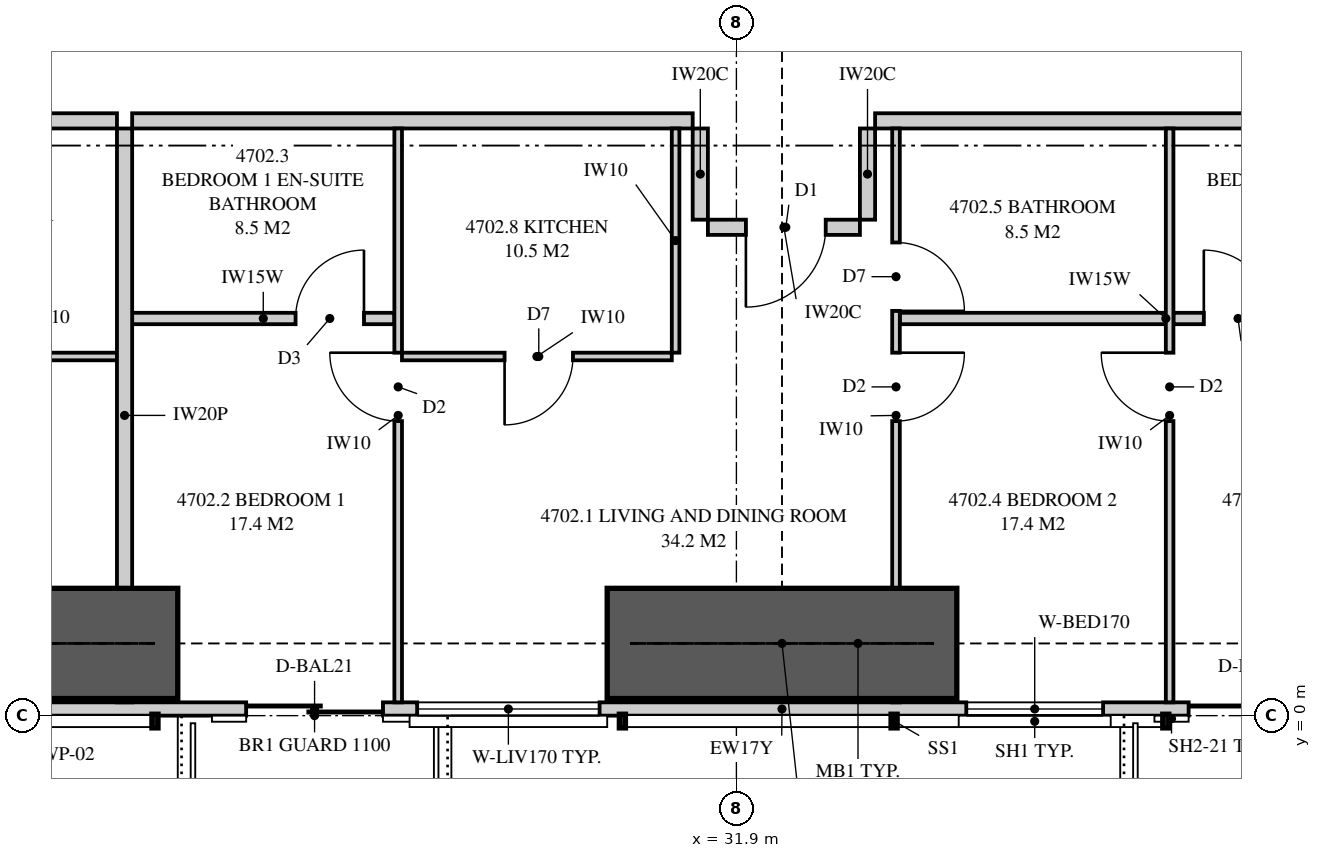
"""IFC4 building model, lengths in metres.
Left out: names, types, materials, properties, quantities, classifications, styles, units other than length and angle.
Written with IfcOpenShell. Run it as: python <this file> out.ifc"""

import sys

from ifc_helpers import new_model, si_unit, direction, frame, frame_2d, origin, place, context, subcontext, project, spatial, polyline, rectangle, outline, extrude, element, fill, save


model = new_model("IFC4")
c1 = context("Model", 3, precision=1e-05, world=origin(), true_north=direction((0.0, 1.0)))
c2 = subcontext(c1, "Body", "Model", "MODEL_VIEW")
j1 = project(units=[si_unit("LENGTHUNIT", "METRE"), si_unit("PLANEANGLEUNIT", "RADIAN")], contexts=[c1])
p1 = place(None, origin())
s1 = spatial("IfcSite", under=j1, at=p1, CompositionType="ELEMENT")
p2 = place(p1, origin())
s2 = spatial("IfcBuilding", under=s1, at=p2, CompositionType="ELEMENT")
p3 = place(p2, frame((0.0, 0.0, 174.45)))
s3 = spatial("IfcBuildingStorey", under=s2, at=p3, CompositionType="ELEMENT", Elevation=174.45)
p4 = place(p3, frame((15.051, 0.087, 0.0), z_axis=(0.0, 0.0, 1.0), x_axis=(1.0, 0.0, 0.0)))
e1 = element("IfcWall", 1, at=p4, inside=s3, PredefinedType="SOLIDWALL", context=c2, shape_type="SweptSolid", body=[
    extrude(outline(polyline([(0.0, 0.0), (34.897, 0.0), (34.897, 3.11), (27.91, 3.11), (27.91, 2.15), (27.836, 2.15), (27.836, 3.11), (27.699, 3.11), (27.699, 2.15), (7.199, 2.15), (7.199, 3.11), (7.062, 3.11), (7.062, 2.15), (6.987, 2.15), (6.987, 3.11), (0.0, 3.11), (0.0, 0.0)])), frame((0.0, 0.087, 0.0), z_axis=(0.0, -1.0, 0.0), x_axis=(1.0, 0.0, 0.0)), (0.0, 0.0, 1.0), 0.175),
])
p5 = place(p4, frame((2.31, 0.0, 0.4)))
e2 = element("IfcOpeningElement", 2, at=p5, cuts=e1, PredefinedType="OPENING", context=c2, shape_type="SweptSolid", body=[
    extrude(rectangle(XDim=2.4, YDim=1.7, at=frame_2d((1.2, 0.85))), frame((0.0, 0.097, 0.0), z_axis=(0.0, -1.0, 0.0), x_axis=(1.0, 0.0, 0.0)), (0.0, 0.0, 1.0), 0.195),
])
p6 = place(p4, frame((10.399, 0.0, 0.0)))
e3 = element("IfcOpeningElement", 3, at=p6, cuts=e1, PredefinedType="OPENING", context=c2, shape_type="SweptSolid", body=[
    extrude(rectangle(XDim=1.8, YDim=2.1, at=frame_2d((0.9, 1.05))), frame((0.0, 0.097, 0.0), z_axis=(0.0, -1.0, 0.0), x_axis=(1.0, 0.0, 0.0)), (0.0, 0.0, 1.0), 0.195),
])
p7 = place(p4, frame((12.649, 0.0, 0.4)))
e4 = element("IfcOpeningElement", 4, at=p7, cuts=e1, PredefinedType="OPENING", context=c2, shape_type="SweptSolid", body=[
    extrude(rectangle(XDim=2.4, YDim=1.7, at=frame_2d((1.2, 0.85))), frame((0.0, 0.097, 0.0), z_axis=(0.0, -1.0, 0.0), x_axis=(1.0, 0.0, 0.0)), (0.0, 0.0, 1.0), 0.195),
])
p8 = place(p4, frame((19.874, 0.0, 0.4)))
e5 = element("IfcOpeningElement", 5, at=p8, cuts=e1, PredefinedType="OPENING", context=c2, shape_type="SweptSolid", body=[
    extrude(rectangle(XDim=1.8, YDim=1.7, at=frame_2d((0.9, 0.85))), frame((0.0, 0.097, 0.0), z_axis=(0.0, -1.0, 0.0), x_axis=(1.0, 0.0, 0.0)), (0.0, 0.0, 1.0), 0.195),
])
p9 = place(p4, frame((22.799, 0.0, 0.0)))
e6 = element("IfcOpeningElement", 6, at=p9, cuts=e1, PredefinedType="OPENING", context=c2, shape_type="SweptSolid", body=[
    extrude(rectangle(XDim=1.8, YDim=2.1, at=frame_2d((0.9, 1.05))), frame((0.0, 0.097, 0.0), z_axis=(0.0, -1.0, 0.0), x_axis=(1.0, 0.0, 0.0)), (0.0, 0.0, 1.0), 0.195),
])
p10 = place(p4, frame((30.205, 0.0, 0.4)))
e7 = element("IfcOpeningElement", 7, at=p10, cuts=e1, PredefinedType="OPENING", context=c2, shape_type="SweptSolid", body=[
    extrude(rectangle(XDim=2.4, YDim=1.7, at=frame_2d((1.2, 0.85))), frame((0.0, 0.097, 0.0), z_axis=(0.0, -1.0, 0.0), x_axis=(1.0, 0.0, 0.0)), (0.0, 0.0, 1.0), 0.195),
])
p11 = place(p3, frame((23.85, 0.175, 0.0), z_axis=(0.0, 0.0, 1.0), x_axis=(0.0, 1.0, 0.0)))
e8 = element("IfcWall", 8, at=p11, inside=s3, PredefinedType="PARTITIONING", context=c2, shape_type="SweptSolid", body=[
    extrude(outline(polyline([(0.529, 2.15), (0.0, 2.15), (0.0, 0.0), (0.529, 0.0), (0.529, 0.207), (1.021, 0.207), (1.021, 0.0), (7.55, 0.0), (7.55, 3.11), (1.685, 3.11), (1.685, 2.15), (1.021, 2.15), (1.021, 1.944), (0.529, 1.944), (0.529, 2.15)])), frame((0.0, 0.1, 0.0), z_axis=(0.0, -1.0, 0.0), x_axis=(1.0, 0.0, 0.0)), (0.0, 0.0, 1.0), 0.2),
])
p12 = place(p3, frame((17.85, 7.825, 0.0), z_axis=(0.0, 0.0, 1.0), x_axis=(1.0, 0.0, 0.0)))
e9 = element("IfcWall", 9, at=p12, inside=s3, PredefinedType="PARTITIONING", context=c2, shape_type="SweptSolid", body=[
    extrude(outline(polyline([(0.0, 0.0), (5.9, 0.0), (5.9, 3.11), (4.737, 3.11), (4.737, 2.541), (4.062, 2.541), (4.062, 3.11), (0.0, 3.11), (0.0, 0.0)])), frame((0.0, 0.1, 0.0), z_axis=(0.0, -1.0, 0.0), x_axis=(1.0, 0.0, 0.0)), (0.0, 0.0, 1.0), 0.2),
])
p13 = place(p12, frame((2.5, 0.0, 0.0)))
e10 = element("IfcOpeningElement", 10, at=p13, cuts=e9, PredefinedType="OPENING", context=c2, shape_type="SweptSolid", body=[
    extrude(rectangle(XDim=1.05, YDim=2.2, at=frame_2d((0.525, 1.1))), frame((0.0, 0.11, 0.0), z_axis=(0.0, -1.0, 0.0), x_axis=(1.0, 0.0, 0.0)), (0.0, 0.0, 1.0), 0.22),
])
p14 = place(p3, frame((20.2, 4.725, 0.0), z_axis=(0.0, 0.0, 1.0), x_axis=(1.0, 0.0, 0.0)))
e11 = element("IfcWall", 11, at=p14, inside=s3, PredefinedType="PARTITIONING", context=c2, shape_type="SweptSolid", body=[
    extrude(outline(polyline([(0.0, 0.0), (3.55, 0.0), (3.55, 3.11), (2.337, 3.11), (2.337, 2.541), (1.763, 2.541), (1.763, 3.11), (0.0, 3.11), (0.0, 0.0)])), frame((0.0, 0.05, 0.0), z_axis=(0.0, -1.0, 0.0), x_axis=(1.0, 0.0, 0.0)), (0.0, 0.0, 1.0), 0.1),
])
p15 = place(p14, frame((1.3, 0.0, 0.0)))
e12 = element("IfcOpeningElement", 12, at=p15, cuts=e11, PredefinedType="OPENING", context=c2, shape_type="SweptSolid", body=[
    extrude(rectangle(XDim=0.9, YDim=2.1, at=frame_2d((0.45, 1.05))), frame((0.0, 0.06, 0.0), z_axis=(0.0, -1.0, 0.0), x_axis=(1.0, 0.0, 0.0)), (0.0, 0.0, 1.0), 0.12),
])
p16 = place(p3, frame((23.95, 7.825, 0.0), z_axis=(0.0, 0.0, 1.0), x_axis=(1.0, 0.0, 0.0)))
e13 = element("IfcWall", 13, at=p16, inside=s3, PredefinedType="PARTITIONING", context=c2, shape_type="SweptSolid", body=[
    extrude(rectangle(XDim=7.375, YDim=0.2, at=frame_2d((3.688, 0.0))), origin(), (0.0, 0.0, 1.0), 3.11),
])
p17 = place(p3, frame((27.45, 0.175, 0.0), z_axis=(0.0, 0.0, 1.0), x_axis=(0.0, 1.0, 0.0)))
e14 = element("IfcWall", 14, at=p17, inside=s3, PredefinedType="PARTITIONING", context=c2, shape_type="SweptSolid", body=[
    extrude(outline(polyline([(0.0, 0.0), (7.55, 0.0), (7.55, 3.11), (1.635, 3.11), (1.635, 2.15), (0.0, 2.15), (0.0, 3.11), (0.0, 0.0)])), frame((0.0, 0.05, 0.0), z_axis=(0.0, -1.0, 0.0), x_axis=(1.0, 0.0, 0.0)), (0.0, 0.0, 1.0), 0.1),
])
p18 = place(p17, frame((3.7, 0.0, 0.0)))
e15 = element("IfcOpeningElement", 15, at=p18, cuts=e14, PredefinedType="OPENING", context=c2, shape_type="SweptSolid", body=[
    extrude(rectangle(XDim=0.9, YDim=2.1, at=frame_2d((0.45, 1.05))), frame((0.0, 0.06, 0.0), z_axis=(0.0, -1.0, 0.0), x_axis=(1.0, 0.0, 0.0)), (0.0, 0.0, 1.0), 0.12),
])
p19 = place(p3, frame((34.0, 0.175, 0.0), z_axis=(0.0, 0.0, 1.0), x_axis=(0.0, 1.0, 0.0)))
e16 = element("IfcWall", 16, at=p19, inside=s3, PredefinedType="PARTITIONING", context=c2, shape_type="SweptSolid", body=[
    extrude(outline(polyline([(0.529, 2.15), (0.0, 2.15), (0.0, 0.0), (0.529, 0.0), (0.529, 0.248), (1.021, 0.248), (1.021, 0.0), (7.55, 0.0), (7.55, 3.11), (1.635, 3.11), (1.635, 2.15), (1.021, 2.15), (1.021, 1.902), (0.529, 1.902), (0.529, 2.15)])), frame((0.0, 0.05, 0.0), z_axis=(0.0, -1.0, 0.0), x_axis=(1.0, 0.0, 0.0)), (0.0, 0.0, 1.0), 0.1),
])
p20 = place(p19, frame((3.7, 0.0, 0.0)))
e17 = element("IfcOpeningElement", 17, at=p20, cuts=e16, PredefinedType="OPENING", context=c2, shape_type="SweptSolid", body=[
    extrude(rectangle(XDim=0.9, YDim=2.1, at=frame_2d((0.45, 1.05))), frame((0.0, 0.06, 0.0), z_axis=(0.0, -1.0, 0.0), x_axis=(1.0, 0.0, 0.0)), (0.0, 0.0, 1.0), 0.12),
])
p21 = place(p19, frame((5.15, 0.0, 0.0)))
e18 = element("IfcOpeningElement", 18, at=p21, cuts=e16, PredefinedType="OPENING", context=c2, shape_type="SweptSolid", body=[
    extrude(rectangle(XDim=0.9, YDim=2.1, at=frame_2d((0.45, 1.05))), frame((0.0, 0.06, 0.0), z_axis=(0.0, -1.0, 0.0), x_axis=(1.0, 0.0, 0.0)), (0.0, 0.0, 1.0), 0.12),
])
p22 = place(p3, frame((37.6, 0.175, 0.0), z_axis=(0.0, 0.0, 1.0), x_axis=(0.0, 1.0, 0.0)))
e19 = element("IfcWall", 19, at=p22, inside=s3, PredefinedType="PARTITIONING", context=c2, shape_type="SweptSolid", body=[
    extrude(outline(polyline([(0.0, 0.0), (7.55, 0.0), (7.55, 3.11), (1.635, 3.11), (1.635, 2.15), (0.0, 2.15), (0.0, 3.11), (0.0, 0.0)])), frame((0.0, 0.05, 0.0), z_axis=(0.0, -1.0, 0.0), x_axis=(1.0, 0.0, 0.0)), (0.0, 0.0, 1.0), 0.1),
])
p23 = place(p22, frame((3.7, 0.0, 0.0)))
e20 = element("IfcOpeningElement", 20, at=p23, cuts=e19, PredefinedType="OPENING", context=c2, shape_type="SweptSolid", body=[
    extrude(rectangle(XDim=0.9, YDim=2.1, at=frame_2d((0.45, 1.05))), frame((0.0, 0.06, 0.0), z_axis=(0.0, -1.0, 0.0), x_axis=(1.0, 0.0, 0.0)), (0.0, 0.0, 1.0), 0.12),
])
p24 = place(p3, frame((23.95, 5.225, 0.0), z_axis=(0.0, 0.0, 1.0), x_axis=(1.0, 0.0, 0.0)))
e21 = element("IfcWall", 21, at=p24, inside=s3, PredefinedType="PLUMBINGWALL", context=c2, shape_type="SweptSolid", body=[
    extrude(rectangle(XDim=3.45, YDim=0.15, at=frame_2d((1.725, 0.0))), origin(), (0.0, 0.0, 1.0), 3.11),
])
p25 = place(p24, frame((2.15, 0.0, 0.0)))
e22 = element("IfcOpeningElement", 22, at=p25, cuts=e21, PredefinedType="OPENING", context=c2, shape_type="SweptSolid", body=[
    extrude(rectangle(XDim=0.9, YDim=2.1, at=frame_2d((0.45, 1.05))), frame((0.0, 0.085, 0.0), z_axis=(0.0, -1.0, 0.0), x_axis=(1.0, 0.0, 0.0)), (0.0, 0.0, 1.0), 0.17),
])
p26 = place(p3, frame((34.05, 5.225, 0.0), z_axis=(0.0, 0.0, 1.0), x_axis=(1.0, 0.0, 0.0)))
e23 = element("IfcWall", 23, at=p26, inside=s3, PredefinedType="PLUMBINGWALL", context=c2, shape_type="SweptSolid", body=[
    extrude(rectangle(XDim=3.5, YDim=0.15, at=frame_2d((1.75, 0.0))), origin(), (0.0, 0.0, 1.0), 3.11),
])
p27 = place(p3, frame((37.65, 5.225, 0.0), z_axis=(0.0, 0.0, 1.0), x_axis=(1.0, 0.0, 0.0)))
e24 = element("IfcWall", 24, at=p27, inside=s3, PredefinedType="PLUMBINGWALL", context=c2, shape_type="SweptSolid", body=[
    extrude(rectangle(XDim=3.45, YDim=0.15, at=frame_2d((1.725, 0.0))), origin(), (0.0, 0.0, 1.0), 3.11),
])
p28 = place(p27, frame((0.4, 0.0, 0.0)))
e25 = element("IfcOpeningElement", 25, at=p28, cuts=e24, PredefinedType="OPENING", context=c2, shape_type="SweptSolid", body=[
    extrude(rectangle(XDim=0.9, YDim=2.1, at=frame_2d((0.45, 1.05))), frame((0.0, 0.085, 0.0), z_axis=(0.0, -1.0, 0.0), x_axis=(1.0, 0.0, 0.0)), (0.0, 0.0, 1.0), 0.17),
])
p29 = place(p3, frame((27.5, 4.725, 0.0), z_axis=(0.0, 0.0, 1.0), x_axis=(1.0, 0.0, 0.0)))
e26 = element("IfcWall", 26, at=p29, inside=s3, PredefinedType="PARTITIONING", context=c2, shape_type="SweptSolid", body=[
    extrude(rectangle(XDim=3.55, YDim=0.1, at=frame_2d((1.775, 0.0))), origin(), (0.0, 0.0, 1.0), 3.11),
])
p30 = place(p29, frame((1.35, 0.0, 0.0)))
e27 = element("IfcOpeningElement", 27, at=p30, cuts=e26, PredefinedType="OPENING", context=c2, shape_type="SweptSolid", body=[
    extrude(rectangle(XDim=0.9, YDim=2.1, at=frame_2d((0.45, 1.05))), frame((0.0, 0.06, 0.0), z_axis=(0.0, -1.0, 0.0), x_axis=(1.0, 0.0, 0.0)), (0.0, 0.0, 1.0), 0.12),
])
p31 = place(p3, frame((31.1, 4.775, 0.0), z_axis=(0.0, 0.0, 1.0), x_axis=(0.0, 1.0, 0.0)))
e28 = element("IfcWall", 28, at=p31, inside=s3, PredefinedType="PARTITIONING", context=c2, shape_type="SweptSolid", body=[
    extrude(rectangle(XDim=2.95, YDim=0.1, at=frame_2d((1.475, 0.0))), origin(), (0.0, 0.0, 1.0), 3.11),
])
p32 = place(p3, frame((33.725, 7.825, 0.0), z_axis=(0.0, 0.0, 1.0), x_axis=(1.0, 0.0, 0.0)))
e29 = element("IfcWall", 29, at=p32, inside=s3, PredefinedType="PARTITIONING", context=c2, shape_type="SweptSolid", body=[
    extrude(rectangle(XDim=7.375, YDim=0.2, at=frame_2d((3.688, 0.0))), origin(), (0.0, 0.0, 1.0), 3.11),
])
p33 = place(p3, frame((31.525, 6.425, 0.0), z_axis=(0.0, 0.0, 1.0), x_axis=(1.0, 0.0, 0.0)))
e30 = element("IfcWall", 30, at=p33, inside=s3, PredefinedType="PARTITIONING", context=c2, shape_type="SweptSolid", body=[
    extrude(outline(polyline([(0.0, 0.0), (2.0, 0.0), (2.0, 3.11), (1.312, 3.11), (1.312, 2.541), (0.638, 2.541), (0.638, 3.11), (0.0, 3.11), (0.0, 0.0)])), frame((0.0, 0.1, 0.0), z_axis=(0.0, -1.0, 0.0), x_axis=(1.0, 0.0, 0.0)), (0.0, 0.0, 1.0), 0.2),
])
p34 = place(p33, frame((0.5, 0.0, 0.0)))
e31 = element("IfcOpeningElement", 31, at=p34, cuts=e30, PredefinedType="OPENING", context=c2, shape_type="SweptSolid", body=[
    extrude(rectangle(XDim=1.05, YDim=2.2, at=frame_2d((0.525, 1.1))), frame((0.0, 0.11, 0.0), z_axis=(0.0, -1.0, 0.0), x_axis=(1.0, 0.0, 0.0)), (0.0, 0.0, 1.0), 0.22),
])
for number, where, z_axis, x_axis in (
    (32, (31.425, 7.725, 0.0), (0.0, 0.0, 1.0), (0.0, -1.0, 0.0)),
    (33, (33.625, 7.725, 0.0), (0.0, 0.0, 1.0), (0.0, -1.0, 0.0)),
):
    element("IfcWall", number, at=place(p3, frame(where, z_axis=z_axis, x_axis=x_axis)), inside=s3, PredefinedType="PARTITIONING", context=c2, shape_type="SweptSolid", body=[
        extrude(rectangle(XDim=1.2, YDim=0.2, at=frame_2d((0.6, 0.0))), origin(), (0.0, 0.0, 1.0), 3.11),
    ])
for number, where, z_axis, x_axis in (
    (34, (19.95, 0.95, 0.0), (0.0, 0.0, 1.0), (1.0, 0.0, 0.0)),
    (35, (30.2, 0.95, 0.0), (0.0, 0.0, 1.0), (1.0, 0.0, 0.0)),
):
    element("IfcWall", number, at=place(p3, frame(where, z_axis=z_axis, x_axis=x_axis)), inside=s3, PredefinedType="SHEAR", context=c2, shape_type="SweptSolid", body=[
        extrude(rectangle(XDim=4.6, YDim=1.45, at=frame_2d((2.3, 0.0))), origin(), (0.0, 0.0, 1.0), 3.35),
    ])
p35 = place(p6, origin())
e36 = element("IfcDoor", 36, at=p35, inside=s3, OperationType="SLIDING_TO_LEFT", PredefinedType="DOOR", context=c2, shape_type="SweptSolid", body=[
    extrude(rectangle(XDim=1.8, YDim=2.1, at=frame_2d((0.9, 1.05))), frame((0.0, 0.025, 0.0), z_axis=(0.0, -1.0, 0.0), x_axis=(1.0, 0.0, 0.0)), (0.0, 0.0, 1.0), 0.05),
])
fill(e3, e36)
p36 = place(p7, origin())
e37 = element("IfcWindow", 37, at=p36, inside=s3, PartitioningType="SINGLE_PANEL", PredefinedType="WINDOW", context=c2, shape_type="SweptSolid", body=[
    extrude(rectangle(XDim=2.4, YDim=1.7, at=frame_2d((1.2, 0.85))), frame((0.0, 0.03, 0.0), z_axis=(0.0, -1.0, 0.0), x_axis=(1.0, 0.0, 0.0)), (0.0, 0.0, 1.0), 0.06),
])
fill(e4, e37)
p37 = place(p8, origin())
e38 = element("IfcWindow", 38, at=p37, inside=s3, PartitioningType="SINGLE_PANEL", PredefinedType="WINDOW", context=c2, shape_type="SweptSolid", body=[
    extrude(rectangle(XDim=1.8, YDim=1.7, at=frame_2d((0.9, 0.85))), frame((0.0, 0.03, 0.0), z_axis=(0.0, -1.0, 0.0), x_axis=(1.0, 0.0, 0.0)), (0.0, 0.0, 1.0), 0.06),
])
fill(e5, e38)
p38 = place(p9, origin())
e39 = element("IfcDoor", 39, at=p38, inside=s3, OperationType="SLIDING_TO_LEFT", PredefinedType="DOOR", context=c2, shape_type="SweptSolid", body=[
    extrude(rectangle(XDim=1.8, YDim=2.1, at=frame_2d((0.9, 1.05))), frame((0.0, 0.025, 0.0), z_axis=(0.0, -1.0, 0.0), x_axis=(1.0, 0.0, 0.0)), (0.0, 0.0, 1.0), 0.05),
])
fill(e6, e39)
p39 = place(p34, frame((1.05, 0.0, 0.0), z_axis=(0.0, 0.0, 1.0), x_axis=(-1.0, 0.0, 0.0)))
e40 = element("IfcDoor", 40, at=p39, inside=s3, OperationType="SINGLE_SWING_RIGHT", PredefinedType="DOOR", context=c2, shape_type="SweptSolid", body=[
    extrude(rectangle(XDim=1.05, YDim=2.2, at=frame_2d((0.525, 1.1))), frame((0.0, 0.025, 0.0), z_axis=(0.0, -1.0, 0.0), x_axis=(1.0, 0.0, 0.0)), (0.0, 0.0, 1.0), 0.05),
])
fill(e31, e40)
p40 = place(p18, origin())
e41 = element("IfcDoor", 41, at=p40, inside=s3, OperationType="SINGLE_SWING_RIGHT", PredefinedType="DOOR", context=c2, shape_type="SweptSolid", body=[
    extrude(rectangle(XDim=0.9, YDim=2.1, at=frame_2d((0.45, 1.05))), frame((0.0, 0.025, 0.0), z_axis=(0.0, -1.0, 0.0), x_axis=(1.0, 0.0, 0.0)), (0.0, 0.0, 1.0), 0.05),
])
fill(e15, e41)
p41 = place(p25, origin())
e42 = element("IfcDoor", 42, at=p41, inside=s3, OperationType="SINGLE_SWING_RIGHT", PredefinedType="DOOR", context=c2, shape_type="SweptSolid", body=[
    extrude(rectangle(XDim=0.9, YDim=2.1, at=frame_2d((0.45, 1.05))), frame((0.0, 0.025, 0.0), z_axis=(0.0, -1.0, 0.0), x_axis=(1.0, 0.0, 0.0)), (0.0, 0.0, 1.0), 0.05),
])
fill(e22, e42)
p42 = place(p20, frame((0.9, 0.0, 0.0), z_axis=(0.0, 0.0, 1.0), x_axis=(-1.0, 0.0, 0.0)))
e43 = element("IfcDoor", 43, at=p42, inside=s3, OperationType="SINGLE_SWING_LEFT", PredefinedType="DOOR", context=c2, shape_type="SweptSolid", body=[
    extrude(rectangle(XDim=0.9, YDim=2.1, at=frame_2d((0.45, 1.05))), frame((0.0, 0.025, 0.0), z_axis=(0.0, -1.0, 0.0), x_axis=(1.0, 0.0, 0.0)), (0.0, 0.0, 1.0), 0.05),
])
fill(e17, e43)
p43 = place(p21, frame((0.9, 0.0, 0.0), z_axis=(0.0, 0.0, 1.0), x_axis=(-1.0, 0.0, 0.0)))
e44 = element("IfcDoor", 44, at=p43, inside=s3, OperationType="SINGLE_SWING_RIGHT", PredefinedType="DOOR", context=c2, shape_type="SweptSolid", body=[
    extrude(rectangle(XDim=0.9, YDim=2.1, at=frame_2d((0.45, 1.05))), frame((0.0, 0.025, 0.0), z_axis=(0.0, -1.0, 0.0), x_axis=(1.0, 0.0, 0.0)), (0.0, 0.0, 1.0), 0.05),
])
fill(e18, e44)
p44 = place(p23, origin())
e45 = element("IfcDoor", 45, at=p44, inside=s3, OperationType="SINGLE_SWING_RIGHT", PredefinedType="DOOR", context=c2, shape_type="SweptSolid", body=[
    extrude(rectangle(XDim=0.9, YDim=2.1, at=frame_2d((0.45, 1.05))), frame((0.0, 0.025, 0.0), z_axis=(0.0, -1.0, 0.0), x_axis=(1.0, 0.0, 0.0)), (0.0, 0.0, 1.0), 0.05),
])
fill(e20, e45)
p45 = place(p28, origin())
e46 = element("IfcDoor", 46, at=p45, inside=s3, OperationType="SINGLE_SWING_LEFT", PredefinedType="DOOR", context=c2, shape_type="SweptSolid", body=[
    extrude(rectangle(XDim=0.9, YDim=2.1, at=frame_2d((0.45, 1.05))), frame((0.0, 0.025, 0.0), z_axis=(0.0, -1.0, 0.0), x_axis=(1.0, 0.0, 0.0)), (0.0, 0.0, 1.0), 0.05),
])
fill(e25, e46)
p46 = place(p30, frame((0.9, 0.0, 0.0), z_axis=(0.0, 0.0, 1.0), x_axis=(-1.0, 0.0, 0.0)))
e47 = element("IfcDoor", 47, at=p46, inside=s3, OperationType="SINGLE_SWING_RIGHT", PredefinedType="DOOR", context=c2, shape_type="SweptSolid", body=[
    extrude(rectangle(XDim=0.9, YDim=2.1, at=frame_2d((0.45, 1.05))), frame((0.0, 0.025, 0.0), z_axis=(0.0, -1.0, 0.0), x_axis=(1.0, 0.0, 0.0)), (0.0, 0.0, 1.0), 0.05),
])
fill(e27, e47)
save(model, sys.argv[1])
